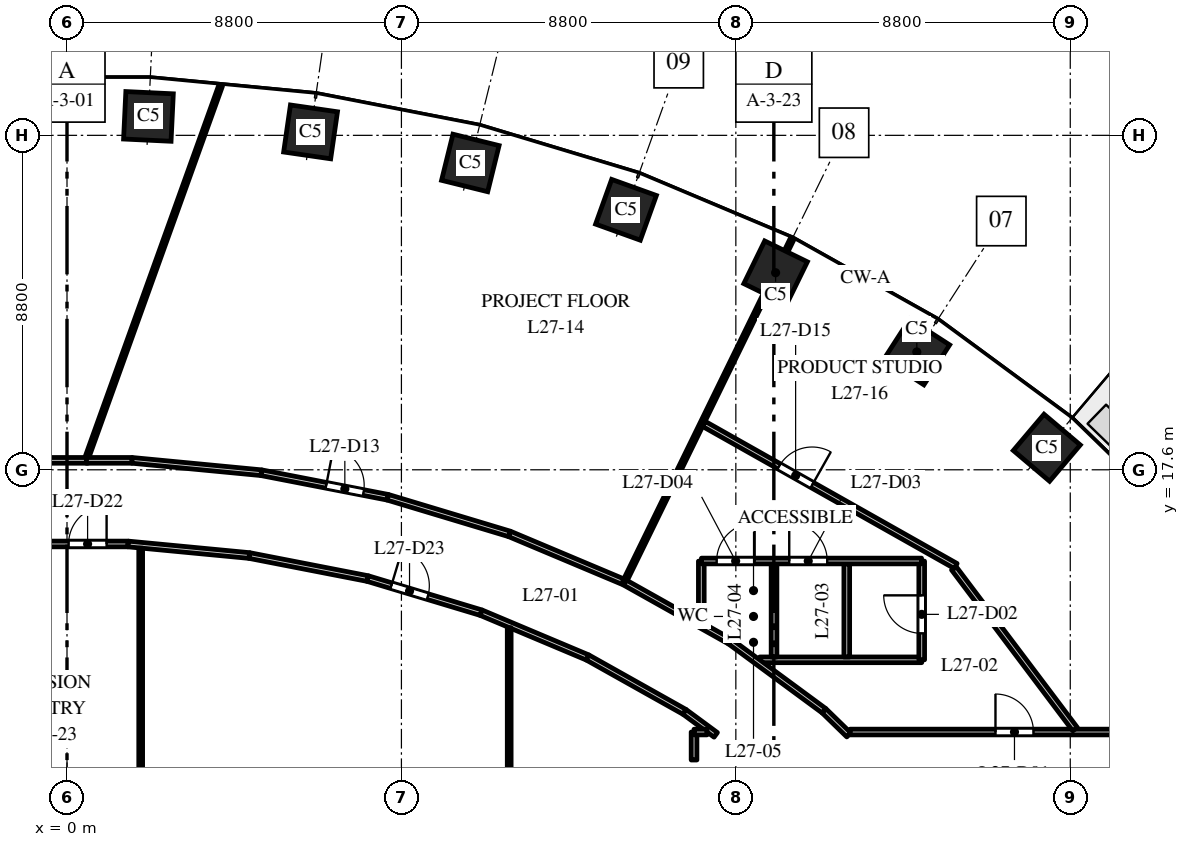
"""IFC4 building model, lengths in metres.
Left out: names, types, materials, properties, quantities, classifications, styles, units other than length and angle.
Written with IfcOpenShell. Run it as: python <this file> out.ifc"""

import sys

from ifc_helpers import new_model, si_unit, direction, frame, frame_2d, origin, origin_2d, place, context, subcontext, project, spatial, rectangle, extrude, element, fill, save


model = new_model("IFC4")
c1 = context("Model", 3, precision=1e-05, world=origin(), true_north=direction((0.0, 1.0)))
c2 = subcontext(c1, "Body", "Model", "MODEL_VIEW")
j1 = project(units=[si_unit("LENGTHUNIT", "METRE"), si_unit("PLANEANGLEUNIT", "RADIAN")], contexts=[c1])
p1 = place(None, origin())
s1 = spatial("IfcSite", under=j1, at=p1, CompositionType="ELEMENT")
p2 = place(p1, origin())
s2 = spatial("IfcBuilding", under=s1, at=p2, CompositionType="ELEMENT")
p3 = place(p2, frame((0.0, 0.0, 120.0)))
s3 = spatial("IfcBuildingStorey", under=s2, at=p3, CompositionType="ELEMENT", Elevation=120.0)
for number, where, z_axis, x_axis in (
    (1, (25.783, 18.18, 0.0), (0.0, 0.0, 1.0), (-0.763, 0.646, 0.0)),
    (2, (22.362, 20.7, 0.0), (0.0, 0.0, 1.0), (-0.84, 0.542, 0.0)),
    (3, (18.646, 22.785, 0.0), (0.0, 0.0, 1.0), (-0.898, 0.439, 0.0)),
    (4, (14.709, 24.441, 0.0), (0.0, 0.0, 1.0), (-0.941, 0.338, 0.0)),
    (5, (10.613, 25.674, 0.0), (0.0, 0.0, 1.0), (-0.971, 0.24, 0.0)),
    (6, (6.409, 26.491, 0.0), (0.0, 0.0, 1.0), (-0.99, 0.143, 0.0)),
    (7, (2.143, 26.898, 0.0), (0.0, 0.0, 1.0), (-0.999, 0.048, 0.0)),
):
    element("IfcColumn", number, at=place(p3, frame(where, z_axis=z_axis, x_axis=x_axis)), inside=s3, PredefinedType="COLUMN", context=c2, shape_type="SweptSolid", body=[
        extrude(rectangle(XDim=1.25, YDim=1.25, at=origin_2d()), origin(), (0.0, 0.0, 1.0), 4.0),
    ])
p4 = place(p3, frame((-1.712, 17.848, 0.0), z_axis=(0.0, 0.0, 1.0), x_axis=(1.0, 0.0, 0.0)))
e8 = element("IfcWall", 8, at=p4, inside=s3, PredefinedType="PARTITIONING", context=c2, shape_type="SweptSolid", body=[
    extrude(rectangle(XDim=2.262, YDim=0.15, at=frame_2d((1.131, 0.0))), origin(), (0.0, 0.0, 1.0), 2.85),
])
p5 = place(p3, frame((-1.608, 15.648, 0.0), z_axis=(0.0, 0.0, 1.0), x_axis=(1.0, 0.0, 0.0)))
e9 = element("IfcWall", 9, at=p5, inside=s3, PredefinedType="PARTITIONING", context=c2, shape_type="SweptSolid", body=[
    extrude(rectangle(XDim=3.216, YDim=0.15, at=frame_2d((1.608, 0.0))), origin(), (0.0, 0.0, 1.0), 2.85),
])
p6 = place(p5, frame((1.65, 0.0, 0.0)))
e10 = element("IfcOpeningElement", 10, at=p6, cuts=e9, PredefinedType="OPENING", context=c2, shape_type="SweptSolid", body=[
    extrude(rectangle(XDim=1.0, YDim=2.1, at=frame_2d((0.5, 1.05))), frame((0.0, 0.085, 0.0), z_axis=(0.0, -1.0, 0.0), x_axis=(1.0, 0.0, 0.0)), (0.0, 0.0, 1.0), 0.17),
])
p7 = place(p3, frame((0.523, 17.923, 0.0), z_axis=(0.0, 0.0, 1.0), x_axis=(0.338475258228, 0.940975291688, 0.0)))
e11 = element("IfcWall", 11, at=p7, inside=s3, PredefinedType="PARTITIONING", context=c2, shape_type="SweptSolid", body=[
    extrude(rectangle(XDim=10.408, YDim=0.1, at=frame_2d((5.204, 0.0))), origin(), (0.0, 0.0, 1.0), 2.9),
])
p8 = place(p3, frame((0.509, 17.848, 0.0), z_axis=(0.0, 0.0, 1.0), x_axis=(1.0, 0.0, 0.0)))
e12 = element("IfcWall", 12, at=p8, inside=s3, PredefinedType="PARTITIONING", context=c2, shape_type="SweptSolid", body=[
    extrude(rectangle(XDim=1.203, YDim=0.15, at=frame_2d((0.602, 0.0))), origin(), (0.0, 0.0, 1.0), 3.7),
])
p9 = place(p3, frame((1.608, 15.648, 0.0), z_axis=(0.0, 0.0, 1.0), x_axis=(0.995491705426, -0.09484863957, 0.0)))
e13 = element("IfcWall", 13, at=p9, inside=s3, PredefinedType="PARTITIONING", context=c2, shape_type="SweptSolid", body=[
    extrude(rectangle(XDim=3.205, YDim=0.15, at=frame_2d((1.602, 0.0))), origin(), (0.0, 0.0, 1.0), 2.85),
])
p10 = place(p3, frame((1.712, 17.848, 0.0), z_axis=(0.0, 0.0, 1.0), x_axis=(0.995466844572, -0.095109207532, 0.0)))
e14 = element("IfcWall", 14, at=p10, inside=s3, PredefinedType="PARTITIONING", context=c2, shape_type="SweptSolid", body=[
    extrude(rectangle(XDim=3.417, YDim=0.15, at=frame_2d((1.708, 0.0))), origin(), (0.0, 0.0, 1.0), 2.85),
])
p11 = place(p3, frame((1.939, 7.307, 0.0), z_axis=(0.0, 0.0, 1.0), x_axis=(0.0, 1.0, 0.0)))
e15 = element("IfcWall", 15, at=p11, inside=s3, PredefinedType="PARTITIONING", context=c2, shape_type="SweptSolid", body=[
    extrude(rectangle(XDim=8.23, YDim=0.1, at=frame_2d((4.115, 0.0))), origin(), (0.0, 0.0, 1.0), 2.85),
])
p12 = place(p3, frame((4.798, 15.344, 0.0), z_axis=(0.0, 0.0, 1.0), x_axis=(0.981588545092, -0.191007665145, 0.0)))
e16 = element("IfcWall", 16, at=p12, inside=s3, PredefinedType="PARTITIONING", context=c2, shape_type="SweptSolid", body=[
    extrude(rectangle(XDim=3.172, YDim=0.15, at=frame_2d((1.586, 0.0))), origin(), (0.0, 0.0, 1.0), 3.7),
])
p13 = place(p3, frame((5.113, 17.523, 0.0), z_axis=(0.0, 0.0, 1.0), x_axis=(0.981665220565, -0.190613207134, 0.0)))
e17 = element("IfcWall", 17, at=p13, inside=s3, PredefinedType="PARTITIONING", context=c2, shape_type="SweptSolid", body=[
    extrude(rectangle(XDim=3.389, YDim=0.15, at=frame_2d((1.695, 0.0))), origin(), (0.0, 0.0, 1.0), 3.7),
])
p14 = place(p13, frame((1.739, 0.0, 0.0)))
e18 = element("IfcOpeningElement", 18, at=p14, cuts=e17, PredefinedType="OPENING", context=c2, shape_type="SweptSolid", body=[
    extrude(rectangle(XDim=1.0, YDim=2.1, at=frame_2d((0.5, 1.05))), frame((0.0, 0.085, 0.0), z_axis=(0.0, -1.0, 0.0), x_axis=(1.0, 0.0, 0.0)), (0.0, 0.0, 1.0), 0.17),
])
p15 = place(p3, frame((7.912, 14.738, 0.0), z_axis=(0.0, 0.0, 1.0), x_axis=(0.957606118849, -0.28808075455, 0.0)))
e19 = element("IfcWall", 19, at=p15, inside=s3, PredefinedType="PARTITIONING", context=c2, shape_type="SweptSolid", body=[
    extrude(rectangle(XDim=3.117, YDim=0.15, at=frame_2d((1.559, 0.0))), origin(), (0.0, 0.0, 1.0), 2.85),
])
p16 = place(p15, frame((0.65, 0.0, 0.0)))
e20 = element("IfcOpeningElement", 20, at=p16, cuts=e19, PredefinedType="OPENING", context=c2, shape_type="SweptSolid", body=[
    extrude(rectangle(XDim=1.0, YDim=2.1, at=frame_2d((0.5, 1.05))), frame((0.0, 0.085, 0.0), z_axis=(0.0, -1.0, 0.0), x_axis=(1.0, 0.0, 0.0)), (0.0, 0.0, 1.0), 0.17),
])
p17 = place(p3, frame((8.44, 16.877, 0.0), z_axis=(0.0, 0.0, 1.0), x_axis=(0.957584891346, -0.288151307243, 0.0)))
e21 = element("IfcWall", 21, at=p17, inside=s3, PredefinedType="PARTITIONING", context=c2, shape_type="SweptSolid", body=[
    extrude(rectangle(XDim=3.345, YDim=0.15, at=frame_2d((1.672, 0.0))), origin(), (0.0, 0.0, 1.0), 2.85),
])
p18 = place(p3, frame((10.897, 13.84, 0.0), z_axis=(0.0, 0.0, 1.0), x_axis=(0.921751821358, -0.387780324183, 0.0)))
e22 = element("IfcWall", 22, at=p18, inside=s3, PredefinedType="PARTITIONING", context=c2, shape_type="SweptSolid", body=[
    extrude(rectangle(XDim=3.038, YDim=0.15, at=frame_2d((1.519, 0.0))), origin(), (0.0, 0.0, 1.0), 3.7),
])
p19 = place(p3, frame((11.636, -13.444, 0.0), z_axis=(0.0, 0.0, 1.0), x_axis=(0.0, 1.0, 0.0)))
e23 = element("IfcWall", 23, at=p19, inside=s3, PredefinedType="PARTITIONING", context=c2, shape_type="SweptSolid", body=[
    extrude(rectangle(XDim=26.888, YDim=0.1, at=frame_2d((13.444, 0.0))), origin(), (0.0, 0.0, 1.0), 2.75),
])
p20 = place(p3, frame((11.643, 15.913, 0.0), z_axis=(0.0, 0.0, 1.0), x_axis=(0.921789499058, -0.38769075231, 0.0)))
e24 = element("IfcWall", 24, at=p20, inside=s3, PredefinedType="PARTITIONING", context=c2, shape_type="SweptSolid", body=[
    extrude(rectangle(XDim=3.278, YDim=0.15, at=frame_2d((1.639, 0.0))), origin(), (0.0, 0.0, 1.0), 3.7),
])
p21 = place(p3, frame((13.697, 12.662, 0.0), z_axis=(0.0, 0.0, 1.0), x_axis=(0.872147381065, -0.489243237767, 0.0)))
e25 = element("IfcWall", 25, at=p21, inside=s3, PredefinedType="PARTITIONING", context=c2, shape_type="SweptSolid", body=[
    extrude(rectangle(XDim=2.927, YDim=0.15, at=frame_2d((1.464, 0.0))), origin(), (0.0, 0.0, 1.0), 3.7),
])
p22 = place(p3, frame((14.667, 14.646, 0.0), z_axis=(0.0, 0.0, 1.0), x_axis=(0.439197946233, 0.898390318305, 0.0)))
e26 = element("IfcWall", 26, at=p22, inside=s3, PredefinedType="PARTITIONING", context=c2, shape_type="SweptSolid", body=[
    extrude(rectangle(XDim=10.061, YDim=0.1, at=frame_2d((5.031, 0.0))), origin(), (0.0, 0.0, 1.0), 2.9),
])
p23 = place(p3, frame((14.682, 14.632, 0.0), z_axis=(0.0, 0.0, 1.0), x_axis=(0.872147050911, -0.489243826315, 0.0)))
e27 = element("IfcWall", 27, at=p23, inside=s3, PredefinedType="PARTITIONING", context=c2, shape_type="SweptSolid", body=[
    extrude(rectangle(XDim=3.168, YDim=0.15, at=frame_2d((1.584, 0.0))), origin(), (0.0, 0.0, 1.0), 3.7),
])
p24 = place(p3, frame((16.25, 11.23, 0.0), z_axis=(0.0, 0.0, 1.0), x_axis=(0.805055837353, -0.59319903805, 0.0)))
e28 = element("IfcWall", 28, at=p24, inside=s3, PredefinedType="PARTITIONING", context=c2, shape_type="SweptSolid", body=[
    extrude(rectangle(XDim=1.02, YDim=0.15, at=frame_2d((0.51, 0.0))), origin(), (0.0, 0.0, 1.0), 3.7),
])
p25 = place(p3, frame((16.5, 9.964, 0.0), z_axis=(0.0, 0.0, 1.0), x_axis=(0.0, 1.0, 0.0)))
e29 = element("IfcWall", 29, at=p25, inside=s3, PredefinedType="PARTITIONING", context=c2, shape_type="SweptSolid", body=[
    extrude(rectangle(XDim=0.736, YDim=0.15, at=frame_2d((0.368, 0.0))), origin(), (0.0, 0.0, 1.0), 3.7),
])
p26 = place(p3, frame((16.5, 10.7, 0.0), z_axis=(0.0, 0.0, 1.0), x_axis=(1.0, 0.0, 0.0)))
e30 = element("IfcWall", 30, at=p26, inside=s3, PredefinedType="PARTITIONING", context=c2, shape_type="SweptSolid", body=[
    extrude(rectangle(XDim=0.343, YDim=0.15, at=frame_2d((0.171, 0.0))), origin(), (0.0, 0.0, 1.0), 3.7),
])
p27 = place(p3, frame((16.691, 13.595, 0.0), z_axis=(0.0, 0.0, 1.0), x_axis=(0.0, 1.0, 0.0)))
e31 = element("IfcWall", 31, at=p27, inside=s3, PredefinedType="PARTITIONING", context=c2, shape_type="SweptSolid", body=[
    extrude(rectangle(XDim=1.601, YDim=0.15, at=frame_2d((0.801, 0.0))), origin(), (0.0, 0.0, 1.0), 3.7),
])
p28 = place(p3, frame((16.695, 15.2, 0.0), z_axis=(0.0, 0.0, 1.0), x_axis=(1.0, 0.0, 0.0)))
e32 = element("IfcWall", 32, at=p28, inside=s3, PredefinedType="PARTITIONING", context=c2, shape_type="SweptSolid", body=[
    extrude(rectangle(XDim=5.792, YDim=0.15, at=frame_2d((2.896, 0.0))), origin(), (0.0, 0.0, 1.0), 3.7),
])
p29 = place(p28, frame((2.31, 0.0, 0.0)))
e33 = element("IfcOpeningElement", 33, at=p29, cuts=e32, PredefinedType="OPENING", context=c2, shape_type="SweptSolid", body=[
    extrude(rectangle(XDim=1.0, YDim=2.1, at=frame_2d((0.5, 1.05))), frame((0.0, 0.085, 0.0), z_axis=(0.0, -1.0, 0.0), x_axis=(1.0, 0.0, 0.0)), (0.0, 0.0, 1.0), 0.17),
])
p30 = place(p28, frame((0.4, 0.0, 0.0)))
e34 = element("IfcOpeningElement", 34, at=p30, cuts=e32, PredefinedType="OPENING", context=c2, shape_type="SweptSolid", body=[
    extrude(rectangle(XDim=1.0, YDim=2.1, at=frame_2d((0.5, 1.05))), frame((0.0, 0.085, 0.0), z_axis=(0.0, -1.0, 0.0), x_axis=(1.0, 0.0, 0.0)), (0.0, 0.0, 1.0), 0.17),
])
p31 = place(p3, frame((16.758, 18.808, 0.0), z_axis=(0.0, 0.0, 1.0), x_axis=(0.870913339681, -0.491436623345, 0.0)))
e35 = element("IfcWall", 35, at=p31, inside=s3, PredefinedType="PARTITIONING", context=c2, shape_type="SweptSolid", body=[
    extrude(rectangle(XDim=7.61, YDim=0.15, at=frame_2d((3.805, 0.0))), origin(), (0.0, 0.0, 1.0), 3.7),
])
p32 = place(p31, frame((2.273, 0.0, 0.0)))
e36 = element("IfcOpeningElement", 36, at=p32, cuts=e35, PredefinedType="OPENING", context=c2, shape_type="SweptSolid", body=[
    extrude(rectangle(XDim=1.0, YDim=2.1, at=frame_2d((0.5, 1.05))), frame((0.0, 0.085, 0.0), z_axis=(0.0, -1.0, 0.0), x_axis=(1.0, 0.0, 0.0)), (0.0, 0.0, 1.0), 0.17),
])
p33 = place(p3, frame((17.445, 13.082, 0.0), z_axis=(0.0, 0.0, 1.0), x_axis=(0.805185638843, -0.593022838516, 0.0)))
e37 = element("IfcWall", 37, at=p33, inside=s3, PredefinedType="PARTITIONING", context=c2, shape_type="SweptSolid", body=[
    extrude(rectangle(XDim=3.073, YDim=0.15, at=frame_2d((1.536, 0.0))), origin(), (0.0, 0.0, 1.0), 3.7),
])
p34 = place(p3, frame((18.229, 12.6, 0.0), z_axis=(0.0, 0.0, 1.0), x_axis=(1.0, 0.0, 0.0)))
e38 = element("IfcWall", 38, at=p34, inside=s3, PredefinedType="PARTITIONING", context=c2, shape_type="SweptSolid", body=[
    extrude(rectangle(XDim=4.262, YDim=0.15, at=frame_2d((2.131, 0.0))), origin(), (0.0, 0.0, 1.0), 3.7),
])
p35 = place(p3, frame((18.605, 12.675, 0.0), z_axis=(0.0, 0.0, 1.0), x_axis=(0.0, 1.0, 0.0)))
e39 = element("IfcWall", 39, at=p35, inside=s3, PredefinedType="PARTITIONING", context=c2, shape_type="SweptSolid", body=[
    extrude(rectangle(XDim=2.45, YDim=0.15, at=frame_2d((1.225, 0.0))), origin(), (0.0, 0.0, 1.0), 3.7),
])
p36 = place(p3, frame((19.919, 11.26, 0.0), z_axis=(0.0, 0.0, 1.0), x_axis=(0.716953986293, -0.697120492841, 0.0)))
e40 = element("IfcWall", 40, at=p36, inside=s3, PredefinedType="PARTITIONING", context=c2, shape_type="SweptSolid", body=[
    extrude(rectangle(XDim=0.911, YDim=0.15, at=frame_2d((0.456, 0.0))), origin(), (0.0, 0.0, 1.0), 2.75),
])
p37 = place(p3, frame((20.603, 10.7, 0.0), z_axis=(0.0, 0.0, 1.0), x_axis=(1.0, 0.0, 0.0)))
e41 = element("IfcWall", 41, at=p37, inside=s3, PredefinedType="PARTITIONING", context=c2, shape_type="SweptSolid", body=[
    extrude(rectangle(XDim=10.897, YDim=0.15, at=frame_2d((5.448, 0.0))), origin(), (0.0, 0.0, 1.0), 2.9),
])
p38 = place(p37, frame((3.829, 0.0, 0.0)))
e42 = element("IfcOpeningElement", 42, at=p38, cuts=e41, PredefinedType="OPENING", context=c2, shape_type="SweptSolid", body=[
    extrude(rectangle(XDim=1.0, YDim=2.1, at=frame_2d((0.5, 1.05))), frame((0.0, 0.085, 0.0), z_axis=(0.0, -1.0, 0.0), x_axis=(1.0, 0.0, 0.0)), (0.0, 0.0, 1.0), 0.17),
])
p39 = place(p3, frame((20.519, 12.675, 0.0), z_axis=(0.0, 0.0, 1.0), x_axis=(0.0, 1.0, 0.0)))
e43 = element("IfcWall", 43, at=p39, inside=s3, PredefinedType="PARTITIONING", context=c2, shape_type="SweptSolid", body=[
    extrude(rectangle(XDim=2.45, YDim=0.15, at=frame_2d((1.225, 0.0))), origin(), (0.0, 0.0, 1.0), 3.7),
])
p40 = place(p3, frame((22.491, 12.6, 0.0), z_axis=(0.0, 0.0, 1.0), x_axis=(0.0, 1.0, 0.0)))
e44 = element("IfcWall", 44, at=p40, inside=s3, PredefinedType="PARTITIONING", context=c2, shape_type="SweptSolid", body=[
    extrude(rectangle(XDim=2.596, YDim=0.15, at=frame_2d((1.298, 0.0))), origin(), (0.0, 0.0, 1.0), 3.7),
])
p41 = place(p40, frame((0.696, 0.0, 0.0)))
e45 = element("IfcOpeningElement", 45, at=p41, cuts=e44, PredefinedType="OPENING", context=c2, shape_type="SweptSolid", body=[
    extrude(rectangle(XDim=1.0, YDim=2.1, at=frame_2d((0.5, 1.05))), frame((0.0, 0.085, 0.0), z_axis=(0.0, -1.0, 0.0), x_axis=(1.0, 0.0, 0.0)), (0.0, 0.0, 1.0), 0.17),
])
p42 = place(p3, frame((23.336, 15.01, 0.0), z_axis=(0.0, 0.0, 1.0), x_axis=(0.601641668664, -0.79876611253, 0.0)))
e46 = element("IfcWall", 46, at=p42, inside=s3, PredefinedType="PARTITIONING", context=c2, shape_type="SweptSolid", body=[
    extrude(rectangle(XDim=5.302, YDim=0.15, at=frame_2d((2.651, 0.0))), origin(), (0.0, 0.0, 1.0), 2.75),
])
p43 = place(p38, origin())
e47 = element("IfcDoor", 47, at=p43, inside=s3, OperationType="SINGLE_SWING_LEFT", PredefinedType="DOOR", context=c2, shape_type="SweptSolid", body=[
    extrude(rectangle(XDim=1.0, YDim=2.1, at=frame_2d((0.5, 1.05))), frame((0.0, 0.025, 0.0), z_axis=(0.0, -1.0, 0.0), x_axis=(1.0, 0.0, 0.0)), (0.0, 0.0, 1.0), 0.05),
])
fill(e42, e47)
p44 = place(p41, origin())
e48 = element("IfcDoor", 48, at=p44, inside=s3, OperationType="SINGLE_SWING_RIGHT", PredefinedType="DOOR", context=c2, shape_type="SweptSolid", body=[
    extrude(rectangle(XDim=1.0, YDim=2.1, at=frame_2d((0.5, 1.05))), frame((0.0, 0.025, 0.0), z_axis=(0.0, -1.0, 0.0), x_axis=(1.0, 0.0, 0.0)), (0.0, 0.0, 1.0), 0.05),
])
fill(e45, e48)
p45 = place(p29, origin())
e49 = element("IfcDoor", 49, at=p45, inside=s3, OperationType="SINGLE_SWING_LEFT", PredefinedType="DOOR", context=c2, shape_type="SweptSolid", body=[
    extrude(rectangle(XDim=1.0, YDim=2.1, at=frame_2d((0.5, 1.05))), frame((0.0, 0.025, 0.0), z_axis=(0.0, -1.0, 0.0), x_axis=(1.0, 0.0, 0.0)), (0.0, 0.0, 1.0), 0.05),
])
fill(e33, e49)
p46 = place(p30, origin())
e50 = element("IfcDoor", 50, at=p46, inside=s3, OperationType="SINGLE_SWING_RIGHT", PredefinedType="DOOR", context=c2, shape_type="SweptSolid", body=[
    extrude(rectangle(XDim=1.0, YDim=2.1, at=frame_2d((0.5, 1.05))), frame((0.0, 0.025, 0.0), z_axis=(0.0, -1.0, 0.0), x_axis=(1.0, 0.0, 0.0)), (0.0, 0.0, 1.0), 0.05),
])
fill(e34, e50)
p47 = place(p14, origin())
e51 = element("IfcDoor", 51, at=p47, inside=s3, OperationType="SINGLE_SWING_LEFT", PredefinedType="DOOR", context=c2, shape_type="SweptSolid", body=[
    extrude(rectangle(XDim=1.0, YDim=2.1, at=frame_2d((0.5, 1.05))), frame((0.0, 0.025, 0.0), z_axis=(0.0, -1.0, 0.0), x_axis=(1.0, 0.0, 0.0)), (0.0, 0.0, 1.0), 0.05),
])
fill(e18, e51)
p48 = place(p32, origin())
e52 = element("IfcDoor", 52, at=p48, inside=s3, OperationType="SINGLE_SWING_RIGHT", PredefinedType="DOOR", context=c2, shape_type="SweptSolid", body=[
    extrude(rectangle(XDim=1.0, YDim=2.1, at=frame_2d((0.5, 1.05))), frame((0.0, 0.025, 0.0), z_axis=(0.0, -1.0, 0.0), x_axis=(1.0, 0.0, 0.0)), (0.0, 0.0, 1.0), 0.05),
])
fill(e36, e52)
p49 = place(p6, origin())
e53 = element("IfcDoor", 53, at=p49, inside=s3, OperationType="SINGLE_SWING_RIGHT", PredefinedType="DOOR", context=c2, shape_type="SweptSolid", body=[
    extrude(rectangle(XDim=1.0, YDim=2.1, at=frame_2d((0.5, 1.05))), frame((0.0, 0.025, 0.0), z_axis=(0.0, -1.0, 0.0), x_axis=(1.0, 0.0, 0.0)), (0.0, 0.0, 1.0), 0.05),
])
fill(e10, e53)
p50 = place(p16, origin())
e54 = element("IfcDoor", 54, at=p50, inside=s3, OperationType="SINGLE_SWING_LEFT", PredefinedType="DOOR", context=c2, shape_type="SweptSolid", body=[
    extrude(rectangle(XDim=1.0, YDim=2.1, at=frame_2d((0.5, 1.05))), frame((0.0, 0.025, 0.0), z_axis=(0.0, -1.0, 0.0), x_axis=(1.0, 0.0, 0.0)), (0.0, 0.0, 1.0), 0.05),
])
fill(e20, e54)
save(model, sys.argv[1])
